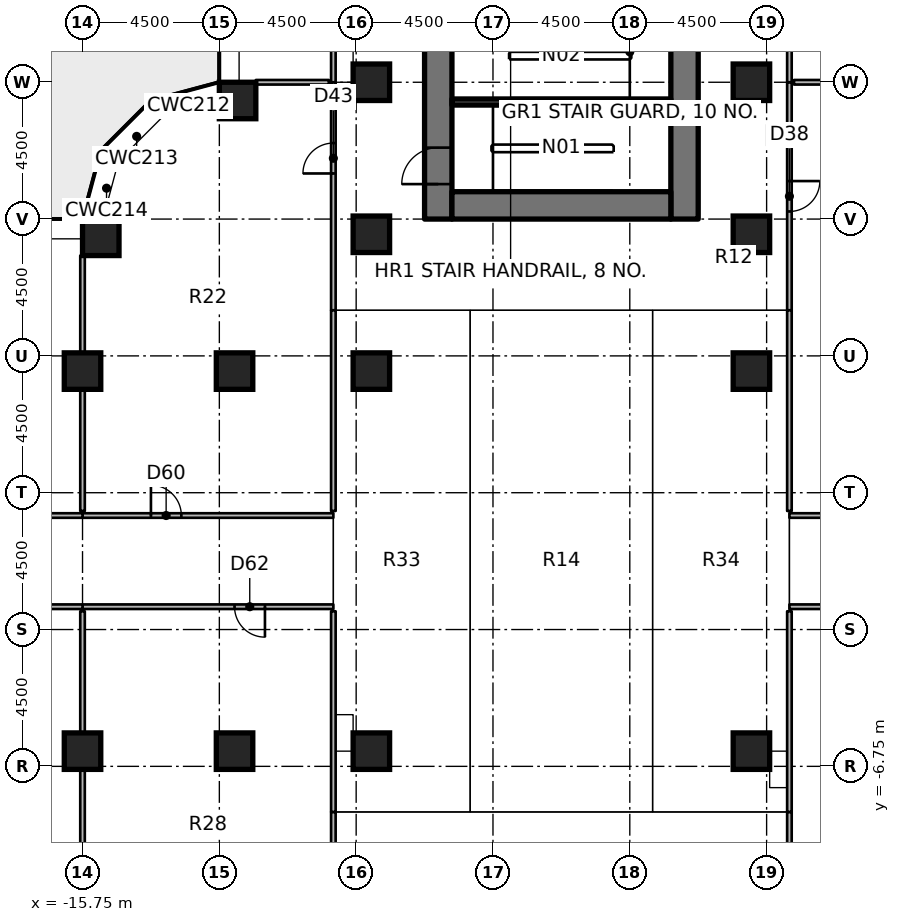
"""IFC4 building model, lengths in metres.
Left out: names, types, materials, properties, quantities, classifications, styles, units other than length and angle.
Written with IfcOpenShell. Run it as: python <this file> out.ifc"""

import sys

from ifc_helpers import new_model, si_unit, direction, frame, frame_2d, origin, origin_2d, place, context, subcontext, project, spatial, rectangle, extrude, element, fill, save


model = new_model("IFC4")
c1 = context("Model", 3, precision=1e-05, world=origin(), true_north=direction((0.0, 1.0)))
c2 = subcontext(c1, "Body", "Model", "MODEL_VIEW")
j1 = project(units=[si_unit("LENGTHUNIT", "METRE"), si_unit("PLANEANGLEUNIT", "RADIAN")], contexts=[c1])
p1 = place(None, origin())
s1 = spatial("IfcSite", under=j1, at=p1, CompositionType="ELEMENT")
p2 = place(p1, origin())
s2 = spatial("IfcBuilding", under=s1, at=p2, CompositionType="ELEMENT")
p3 = place(p2, frame((0.0, 0.0, 22.0)))
s3 = spatial("IfcBuildingStorey", under=s2, at=p3, CompositionType="ELEMENT", Elevation=22.0)
for number, where, z_axis, x_axis in (
    (1, (-15.75, -6.25, 0.0), (0.0, 0.0, 1.0), (1.0, 0.0, 0.0)),
    (2, (-15.75, 6.25, 0.0), (0.0, 0.0, 1.0), (1.0, 0.0, 0.0)),
):
    element("IfcColumn", number, at=place(p3, frame(where, z_axis=z_axis, x_axis=x_axis)), inside=s3, PredefinedType="COLUMN", context=c2, shape_type="SweptSolid", body=[
        extrude(rectangle(XDim=1.2, YDim=1.2, at=origin_2d()), origin(), (0.0, 0.0, 1.0), 4.85),
    ])
p4 = place(p3, frame((-15.15, 10.65, 0.0), z_axis=(0.0, 0.0, 1.0), x_axis=(1.0, 0.0, 0.0)))
e3 = element("IfcColumn", 3, at=p4, inside=s3, PredefinedType="COLUMN", context=c2, shape_type="SweptSolid", body=[
    extrude(rectangle(XDim=1.2, YDim=1.2, at=origin_2d()), origin(), (0.0, 0.0, 1.0), 4.55),
])
for number, where, z_axis, x_axis in (
    (4, (-10.75, -6.25, 0.0), (0.0, 0.0, 1.0), (1.0, 0.0, 0.0)),
    (5, (-10.75, 6.25, 0.0), (0.0, 0.0, 1.0), (1.0, 0.0, 0.0)),
):
    element("IfcColumn", number, at=place(p3, frame(where, z_axis=z_axis, x_axis=x_axis)), inside=s3, PredefinedType="COLUMN", context=c2, shape_type="SweptSolid", body=[
        extrude(rectangle(XDim=1.2, YDim=1.2, at=origin_2d()), origin(), (0.0, 0.0, 1.0), 4.85),
    ])
p5 = place(p3, frame((-10.65, 15.15, 0.0), z_axis=(0.0, 0.0, 1.0), x_axis=(1.0, 0.0, 0.0)))
e6 = element("IfcColumn", 6, at=p5, inside=s3, PredefinedType="COLUMN", context=c2, shape_type="SweptSolid", body=[
    extrude(rectangle(XDim=1.2, YDim=1.2, at=origin_2d()), origin(), (0.0, 0.0, 1.0), 4.55),
])
for number, where, z_axis, x_axis in (
    (7, (-6.25, -6.25, 0.0), (0.0, 0.0, 1.0), (1.0, 0.0, 0.0)),
    (8, (-6.25, 6.25, 0.0), (0.0, 0.0, 1.0), (1.0, 0.0, 0.0)),
    (9, (-6.25, 10.75, 0.0), (0.0, 0.0, 1.0), (1.0, 0.0, 0.0)),
    (10, (-6.25, 15.75, 0.0), (0.0, 0.0, 1.0), (1.0, 0.0, 0.0)),
    (11, (6.25, -6.25, 0.0), (0.0, 0.0, 1.0), (1.0, 0.0, 0.0)),
    (12, (6.25, 6.25, 0.0), (0.0, 0.0, 1.0), (1.0, 0.0, 0.0)),
    (13, (6.25, 10.75, 0.0), (0.0, 0.0, 1.0), (1.0, 0.0, 0.0)),
    (14, (6.25, 15.75, 0.0), (0.0, 0.0, 1.0), (1.0, 0.0, 0.0)),
):
    element("IfcColumn", number, at=place(p3, frame(where, z_axis=z_axis, x_axis=x_axis)), inside=s3, PredefinedType="COLUMN", context=c2, shape_type="SweptSolid", body=[
        extrude(rectangle(XDim=1.2, YDim=1.2, at=origin_2d()), origin(), (0.0, 0.0, 1.0), 4.85),
    ])
p6 = place(p3, frame((-4.05, 11.25, 0.0), z_axis=(0.0, 0.0, 1.0), x_axis=(0.0, 1.0, 0.0)))
e15 = element("IfcWall", 15, at=p6, inside=s3, PredefinedType="SHEAR", context=c2, shape_type="SweptSolid", body=[
    extrude(rectangle(XDim=15.0, YDim=0.9, at=frame_2d((7.5, 0.0))), origin(), (0.0, 0.0, 1.0), 5.0),
])
p7 = place(p6, frame((7.15, 0.0, 0.0)))
e16 = element("IfcOpeningElement", 16, at=p7, cuts=e15, PredefinedType="OPENING", context=c2, shape_type="SweptSolid", body=[
    extrude(rectangle(XDim=1.5, YDim=2.3, at=frame_2d((0.75, 1.15))), frame((0.0, 0.46, 0.0), z_axis=(0.0, -1.0, 0.0), x_axis=(1.0, 0.0, 0.0)), (0.0, 0.0, 1.0), 0.92),
])
p8 = place(p6, frame((13.9, 0.0, 0.0)))
e17 = element("IfcOpeningElement", 17, at=p8, cuts=e15, PredefinedType="OPENING", context=c2, shape_type="SweptSolid", body=[
    extrude(rectangle(XDim=0.9, YDim=2.1, at=frame_2d((0.45, 1.05))), frame((0.0, 0.46, 0.0), z_axis=(0.0, -1.0, 0.0), x_axis=(1.0, 0.0, 0.0)), (0.0, 0.0, 1.0), 0.92),
])
p9 = place(p6, frame((1.15, 0.0, 0.0)))
e18 = element("IfcOpeningElement", 18, at=p9, cuts=e15, PredefinedType="OPENING", context=c2, shape_type="SweptSolid", body=[
    extrude(rectangle(XDim=1.2, YDim=2.1, at=frame_2d((0.6, 1.05))), frame((0.0, 0.46, 0.0), z_axis=(0.0, -1.0, 0.0), x_axis=(1.0, 0.0, 0.0)), (0.0, 0.0, 1.0), 0.92),
])
p10 = place(p3, frame((4.05, 11.25, 0.0), z_axis=(0.0, 0.0, 1.0), x_axis=(0.0, 1.0, 0.0)))
e19 = element("IfcWall", 19, at=p10, inside=s3, PredefinedType="SHEAR", context=c2, shape_type="SweptSolid", body=[
    extrude(rectangle(XDim=15.0, YDim=0.9, at=frame_2d((7.5, 0.0))), origin(), (0.0, 0.0, 1.0), 5.0),
])
p11 = place(p10, frame((7.15, 0.0, 0.0)))
e20 = element("IfcOpeningElement", 20, at=p11, cuts=e19, PredefinedType="OPENING", context=c2, shape_type="SweptSolid", body=[
    extrude(rectangle(XDim=1.5, YDim=2.3, at=frame_2d((0.75, 1.15))), frame((0.0, 0.46, 0.0), z_axis=(0.0, -1.0, 0.0), x_axis=(1.0, 0.0, 0.0)), (0.0, 0.0, 1.0), 0.92),
])
p12 = place(p10, frame((5.55, 0.0, 0.0)))
e21 = element("IfcOpeningElement", 21, at=p12, cuts=e19, PredefinedType="OPENING", context=c2, shape_type="SweptSolid", body=[
    extrude(rectangle(XDim=1.2, YDim=2.1, at=frame_2d((0.6, 1.05))), frame((0.0, 0.46, 0.0), z_axis=(0.0, -1.0, 0.0), x_axis=(1.0, 0.0, 0.0)), (0.0, 0.0, 1.0), 0.92),
])
p13 = place(p3, frame((-3.6, 11.7, 0.0), z_axis=(0.0, 0.0, 1.0), x_axis=(1.0, 0.0, 0.0)))
e22 = element("IfcWall", 22, at=p13, inside=s3, PredefinedType="SHEAR", context=c2, shape_type="SweptSolid", body=[
    extrude(rectangle(XDim=7.2, YDim=0.9, at=frame_2d((3.6, 0.0))), origin(), (0.0, 0.0, 1.0), 5.0),
])
p14 = place(p3, frame((-3.6, 15.1, 0.0), z_axis=(0.0, 0.0, 1.0), x_axis=(1.0, 0.0, 0.0)))
e23 = element("IfcWall", 23, at=p14, inside=s3, PredefinedType="SHEAR", context=c2, shape_type="SweptSolid", body=[
    extrude(rectangle(XDim=7.2, YDim=0.2, at=frame_2d((3.6, 0.0))), origin(), (0.0, 0.0, 1.0), 4.85),
])
p15 = place(p3, frame((7.5, 15.75, 0.0), z_axis=(0.0, 0.0, 1.0), x_axis=(0.0, -1.0, 0.0)))
e24 = element("IfcWall", 24, at=p15, inside=s3, PredefinedType="PARTITIONING", context=c2, shape_type="SweptSolid", body=[
    extrude(rectangle(XDim=7.5, YDim=0.15, at=frame_2d((3.75, 0.0))), origin(), (0.0, 0.0, 1.0), 3.93),
])
p16 = place(p15, frame((3.25, 0.0, 0.0)))
e25 = element("IfcOpeningElement", 25, at=p16, cuts=e24, PredefinedType="OPENING", context=c2, shape_type="SweptSolid", body=[
    extrude(rectangle(XDim=1.0, YDim=2.1, at=frame_2d((0.5, 1.05))), frame((0.0, 0.085, 0.0), z_axis=(0.0, -1.0, 0.0), x_axis=(1.0, 0.0, 0.0)), (0.0, 0.0, 1.0), 0.17),
])
p17 = place(p3, frame((7.5, 30.0, 0.0), z_axis=(0.0, 0.0, 1.0), x_axis=(0.0, -1.0, 0.0)))
e26 = element("IfcWall", 26, at=p17, inside=s3, PredefinedType="PARTITIONING", context=c2, shape_type="SweptSolid", body=[
    extrude(rectangle(XDim=14.25, YDim=0.15, at=frame_2d((7.125, 0.0))), origin(), (0.0, 0.0, 1.0), 4.55),
])
p18 = place(p17, frame((6.675, 0.0, 0.0)))
e27 = element("IfcOpeningElement", 27, at=p18, cuts=e26, PredefinedType="OPENING", context=c2, shape_type="SweptSolid", body=[
    extrude(rectangle(XDim=0.9, YDim=2.1, at=frame_2d((0.45, 1.05))), frame((0.0, 0.085, 0.0), z_axis=(0.0, -1.0, 0.0), x_axis=(1.0, 0.0, 0.0)), (0.0, 0.0, 1.0), 0.17),
])
p19 = place(p3, frame((-7.5, 8.25, 0.0), z_axis=(0.0, 0.0, 1.0), x_axis=(0.0, 1.0, 0.0)))
e28 = element("IfcWall", 28, at=p19, inside=s3, PredefinedType="PARTITIONING", context=c2, shape_type="SweptSolid", body=[
    extrude(rectangle(XDim=7.5, YDim=0.15, at=frame_2d((3.75, 0.0))), origin(), (0.0, 0.0, 1.0), 3.93),
])
p20 = place(p19, frame((4.5, 0.0, 0.0)))
e29 = element("IfcOpeningElement", 29, at=p20, cuts=e28, PredefinedType="OPENING", context=c2, shape_type="SweptSolid", body=[
    extrude(rectangle(XDim=1.0, YDim=2.1, at=frame_2d((0.5, 1.05))), frame((0.0, 0.085, 0.0), z_axis=(0.0, -1.0, 0.0), x_axis=(1.0, 0.0, 0.0)), (0.0, 0.0, 1.0), 0.17),
])
p21 = place(p3, frame((-7.5, 15.75, 0.0), z_axis=(0.0, 0.0, 1.0), x_axis=(0.0, 1.0, 0.0)))
e30 = element("IfcWall", 30, at=p21, inside=s3, PredefinedType="PARTITIONING", context=c2, shape_type="SweptSolid", body=[
    extrude(rectangle(XDim=14.25, YDim=0.15, at=frame_2d((7.125, 0.0))), origin(), (0.0, 0.0, 1.0), 4.55),
])
p22 = place(p21, frame((6.675, 0.0, 0.0)))
e31 = element("IfcOpeningElement", 31, at=p22, cuts=e30, PredefinedType="OPENING", context=c2, shape_type="SweptSolid", body=[
    extrude(rectangle(XDim=0.9, YDim=2.1, at=frame_2d((0.45, 1.05))), frame((0.0, 0.085, 0.0), z_axis=(0.0, -1.0, 0.0), x_axis=(1.0, 0.0, 0.0)), (0.0, 0.0, 1.0), 0.17),
])
p23 = place(p3, frame((7.5, -8.25, 0.0), z_axis=(0.0, 0.0, 1.0), x_axis=(0.0, -1.0, 0.0)))
e32 = element("IfcWall", 32, at=p23, inside=s3, PredefinedType="PARTITIONING", context=c2, shape_type="SweptSolid", body=[
    extrude(rectangle(XDim=7.5, YDim=0.15, at=frame_2d((3.75, 0.0))), origin(), (0.0, 0.0, 1.0), 3.93),
])
p24 = place(p3, frame((-7.5, -15.75, 0.0), z_axis=(0.0, 0.0, 1.0), x_axis=(0.0, 1.0, 0.0)))
e33 = element("IfcWall", 33, at=p24, inside=s3, PredefinedType="PARTITIONING", context=c2, shape_type="SweptSolid", body=[
    extrude(rectangle(XDim=7.5, YDim=0.15, at=frame_2d((3.75, 0.0))), origin(), (0.0, 0.0, 1.0), 3.93),
])
p25 = place(p24, frame((3.25, 0.0, 0.0)))
e34 = element("IfcOpeningElement", 34, at=p25, cuts=e33, PredefinedType="OPENING", context=c2, shape_type="SweptSolid", body=[
    extrude(rectangle(XDim=1.0, YDim=2.1, at=frame_2d((0.5, 1.05))), frame((0.0, 0.085, 0.0), z_axis=(0.0, -1.0, 0.0), x_axis=(1.0, 0.0, 0.0)), (0.0, 0.0, 1.0), 0.17),
])
p26 = place(p3, frame((7.5, 1.5, 0.0), z_axis=(0.0, 0.0, 1.0), x_axis=(1.0, 0.0, 0.0)))
e35 = element("IfcWall", 35, at=p26, inside=s3, PredefinedType="PARTITIONING", context=c2, shape_type="SweptSolid", body=[
    extrude(rectangle(XDim=8.25, YDim=0.15, at=frame_2d((4.125, 0.0))), origin(), (0.0, 0.0, 1.0), 4.063),
])
p27 = place(p26, frame((2.25, 0.0, 0.0)))
e36 = element("IfcOpeningElement", 36, at=p27, cuts=e35, PredefinedType="OPENING", context=c2, shape_type="SweptSolid", body=[
    extrude(rectangle(XDim=1.0, YDim=2.1, at=frame_2d((0.5, 1.05))), frame((0.0, 0.085, 0.0), z_axis=(0.0, -1.0, 0.0), x_axis=(1.0, 0.0, 0.0)), (0.0, 0.0, 1.0), 0.17),
])
p28 = place(p3, frame((15.75, -1.5, 0.0), z_axis=(0.0, 0.0, 1.0), x_axis=(-1.0, 0.0, 0.0)))
e37 = element("IfcWall", 37, at=p28, inside=s3, PredefinedType="PARTITIONING", context=c2, shape_type="SweptSolid", body=[
    extrude(rectangle(XDim=8.25, YDim=0.15, at=frame_2d((4.125, 0.0))), origin(), (0.0, 0.0, 1.0), 4.063),
])
p29 = place(p28, frame((3.675, 0.0, 0.0)))
e38 = element("IfcOpeningElement", 38, at=p29, cuts=e37, PredefinedType="OPENING", context=c2, shape_type="SweptSolid", body=[
    extrude(rectangle(XDim=0.9, YDim=2.1, at=frame_2d((0.45, 1.05))), frame((0.0, 0.085, 0.0), z_axis=(0.0, -1.0, 0.0), x_axis=(1.0, 0.0, 0.0)), (0.0, 0.0, 1.0), 0.17),
])
p30 = place(p3, frame((-15.75, 1.5, 0.0), z_axis=(0.0, 0.0, 1.0), x_axis=(1.0, 0.0, 0.0)))
e39 = element("IfcWall", 39, at=p30, inside=s3, PredefinedType="PARTITIONING", context=c2, shape_type="SweptSolid", body=[
    extrude(rectangle(XDim=8.25, YDim=0.15, at=frame_2d((4.125, 0.0))), origin(), (0.0, 0.0, 1.0), 4.063),
])
p31 = place(p30, frame((2.25, 0.0, 0.0)))
e40 = element("IfcOpeningElement", 40, at=p31, cuts=e39, PredefinedType="OPENING", context=c2, shape_type="SweptSolid", body=[
    extrude(rectangle(XDim=1.0, YDim=2.1, at=frame_2d((0.5, 1.05))), frame((0.0, 0.085, 0.0), z_axis=(0.0, -1.0, 0.0), x_axis=(1.0, 0.0, 0.0)), (0.0, 0.0, 1.0), 0.17),
])
p32 = place(p3, frame((-37.65, 1.5, 0.0), z_axis=(0.0, 0.0, 1.0), x_axis=(1.0, 0.0, 0.0)))
e41 = element("IfcWall", 41, at=p32, inside=s3, PredefinedType="PARTITIONING", context=c2, shape_type="SweptSolid", body=[
    extrude(rectangle(XDim=21.9, YDim=0.15, at=frame_2d((10.95, 0.0))), origin(), (0.0, 0.0, 1.0), 3.93),
])
p33 = place(p32, frame((10.2, 0.0, 0.0)))
e42 = element("IfcOpeningElement", 42, at=p33, cuts=e41, PredefinedType="OPENING", context=c2, shape_type="SweptSolid", body=[
    extrude(rectangle(XDim=0.9, YDim=2.1, at=frame_2d((0.45, 1.05))), frame((0.0, 0.085, 0.0), z_axis=(0.0, -1.0, 0.0), x_axis=(1.0, 0.0, 0.0)), (0.0, 0.0, 1.0), 0.17),
])
p34 = place(p3, frame((-7.5, -1.5, 0.0), z_axis=(0.0, 0.0, 1.0), x_axis=(-1.0, 0.0, 0.0)))
e43 = element("IfcWall", 43, at=p34, inside=s3, PredefinedType="PARTITIONING", context=c2, shape_type="SweptSolid", body=[
    extrude(rectangle(XDim=8.25, YDim=0.15, at=frame_2d((4.125, 0.0))), origin(), (0.0, 0.0, 1.0), 4.063),
])
p35 = place(p34, frame((2.25, 0.0, 0.0)))
e44 = element("IfcOpeningElement", 44, at=p35, cuts=e43, PredefinedType="OPENING", context=c2, shape_type="SweptSolid", body=[
    extrude(rectangle(XDim=1.0, YDim=2.1, at=frame_2d((0.5, 1.05))), frame((0.0, 0.085, 0.0), z_axis=(0.0, -1.0, 0.0), x_axis=(1.0, 0.0, 0.0)), (0.0, 0.0, 1.0), 0.17),
])
p36 = place(p3, frame((-15.75, -1.5, 0.0), z_axis=(0.0, 0.0, 1.0), x_axis=(-1.0, 0.0, 0.0)))
e45 = element("IfcWall", 45, at=p36, inside=s3, PredefinedType="PARTITIONING", context=c2, shape_type="SweptSolid", body=[
    extrude(rectangle(XDim=2.25, YDim=0.15, at=frame_2d((1.125, 0.0))), origin(), (0.0, 0.0, 1.0), 4.063),
])
p37 = place(p3, frame((7.65, 15.75, 0.0), z_axis=(0.0, 0.0, 1.0), x_axis=(1.0, 0.0, 0.0)))
e46 = element("IfcWall", 46, at=p37, inside=s3, PredefinedType="PARTITIONING", context=c2, shape_type="SweptSolid", body=[
    extrude(rectangle(XDim=2.4, YDim=0.15, at=frame_2d((1.2, 0.0))), origin(), (0.0, 0.0, 1.0), 4.55),
])
p38 = place(p3, frame((7.5, 1.65, 0.0), z_axis=(0.0, 0.0, 1.0), x_axis=(0.0, 1.0, 0.0)))
e47 = element("IfcWall", 47, at=p38, inside=s3, PredefinedType="PARTITIONING", context=c2, shape_type="SweptSolid", body=[
    extrude(rectangle(XDim=6.6, YDim=0.15, at=frame_2d((3.3, 0.0))), origin(), (0.0, 0.0, 1.0), 3.911),
])
p39 = place(p3, frame((-15.75, 1.65, 0.0), z_axis=(0.0, 0.0, 1.0), x_axis=(0.0, 1.0, 0.0)))
e48 = element("IfcWall", 48, at=p39, inside=s3, PredefinedType="PARTITIONING", context=c2, shape_type="SweptSolid", body=[
    extrude(rectangle(XDim=4.0, YDim=0.15, at=frame_2d((2.0, 0.0))), origin(), (0.0, 0.0, 1.0), 4.063),
])
p40 = place(p3, frame((-15.75, 6.85, 0.0), z_axis=(0.0, 0.0, 1.0), x_axis=(0.0, 1.0, 0.0)))
e49 = element("IfcWall", 49, at=p40, inside=s3, PredefinedType="PARTITIONING", context=c2, shape_type="SweptSolid", body=[
    extrude(rectangle(XDim=3.2, YDim=0.15, at=frame_2d((1.6, 0.0))), origin(), (0.0, 0.0, 1.0), 4.55),
])
p41 = place(p3, frame((-10.05, 15.75, 0.0), z_axis=(0.0, 0.0, 1.0), x_axis=(1.0, 0.0, 0.0)))
e50 = element("IfcWall", 50, at=p41, inside=s3, PredefinedType="PARTITIONING", context=c2, shape_type="SweptSolid", body=[
    extrude(rectangle(XDim=2.4, YDim=0.15, at=frame_2d((1.2, 0.0))), origin(), (0.0, 0.0, 1.0), 4.55),
])
for number, where, z_axis, x_axis in (
    (51, (-7.5, 8.25, 0.0), (0.0, 0.0, 1.0), (0.0, -1.0, 0.0)),
    (52, (7.5, -8.25, 0.0), (0.0, 0.0, 1.0), (0.0, 1.0, 0.0)),
):
    element("IfcWall", number, at=place(p3, frame(where, z_axis=z_axis, x_axis=x_axis)), inside=s3, PredefinedType="PARTITIONING", context=c2, shape_type="SweptSolid", body=[
        extrude(rectangle(XDim=6.6, YDim=0.15, at=frame_2d((3.3, 0.0))), origin(), (0.0, 0.0, 1.0), 3.911),
    ])
p42 = place(p3, frame((-15.75, -10.05, 0.0), z_axis=(0.0, 0.0, 1.0), x_axis=(0.0, 1.0, 0.0)))
e53 = element("IfcWall", 53, at=p42, inside=s3, PredefinedType="PARTITIONING", context=c2, shape_type="SweptSolid", body=[
    extrude(rectangle(XDim=3.2, YDim=0.15, at=frame_2d((1.6, 0.0))), origin(), (0.0, 0.0, 1.0), 4.55),
])
p43 = place(p3, frame((-15.75, -5.65, 0.0), z_axis=(0.0, 0.0, 1.0), x_axis=(0.0, 1.0, 0.0)))
e54 = element("IfcWall", 54, at=p43, inside=s3, PredefinedType="PARTITIONING", context=c2, shape_type="SweptSolid", body=[
    extrude(rectangle(XDim=4.0, YDim=0.15, at=frame_2d((2.0, 0.0))), origin(), (0.0, 0.0, 1.0), 4.063),
])
p44 = place(p3, frame((-7.5, -1.65, 0.0), z_axis=(0.0, 0.0, 1.0), x_axis=(0.0, -1.0, 0.0)))
e55 = element("IfcWall", 55, at=p44, inside=s3, PredefinedType="PARTITIONING", context=c2, shape_type="SweptSolid", body=[
    extrude(rectangle(XDim=6.6, YDim=0.15, at=frame_2d((3.3, 0.0))), origin(), (0.0, 0.0, 1.0), 3.911),
])
p45 = place(p9, origin())
e56 = element("IfcDoor", 56, at=p45, inside=s3, OperationType="SINGLE_SWING_RIGHT", PredefinedType="DOOR", context=c2, shape_type="SweptSolid", body=[
    extrude(rectangle(XDim=1.2, YDim=2.1, at=frame_2d((0.6, 1.05))), frame((0.0, 0.025, 0.0), z_axis=(0.0, -1.0, 0.0), x_axis=(1.0, 0.0, 0.0)), (0.0, 0.0, 1.0), 0.05),
])
fill(e18, e56)
p46 = place(p16, origin())
e57 = element("IfcDoor", 57, at=p46, inside=s3, OperationType="SINGLE_SWING_LEFT", PredefinedType="DOOR", context=c2, shape_type="SweptSolid", body=[
    extrude(rectangle(XDim=1.0, YDim=2.1, at=frame_2d((0.5, 1.05))), frame((0.0, 0.025, 0.0), z_axis=(0.0, -1.0, 0.0), x_axis=(1.0, 0.0, 0.0)), (0.0, 0.0, 1.0), 0.05),
])
fill(e25, e57)
p47 = place(p20, origin())
e58 = element("IfcDoor", 58, at=p47, inside=s3, OperationType="SINGLE_SWING_LEFT", PredefinedType="DOOR", context=c2, shape_type="SweptSolid", body=[
    extrude(rectangle(XDim=1.0, YDim=2.1, at=frame_2d((0.5, 1.05))), frame((0.0, 0.025, 0.0), z_axis=(0.0, -1.0, 0.0), x_axis=(1.0, 0.0, 0.0)), (0.0, 0.0, 1.0), 0.05),
])
fill(e29, e58)
p48 = place(p31, origin())
e59 = element("IfcDoor", 59, at=p48, inside=s3, OperationType="SINGLE_SWING_LEFT", PredefinedType="DOOR", context=c2, shape_type="SweptSolid", body=[
    extrude(rectangle(XDim=1.0, YDim=2.1, at=frame_2d((0.5, 1.05))), frame((0.0, 0.025, 0.0), z_axis=(0.0, -1.0, 0.0), x_axis=(1.0, 0.0, 0.0)), (0.0, 0.0, 1.0), 0.05),
])
fill(e40, e59)
p49 = place(p35, origin())
e60 = element("IfcDoor", 60, at=p49, inside=s3, OperationType="SINGLE_SWING_LEFT", PredefinedType="DOOR", context=c2, shape_type="SweptSolid", body=[
    extrude(rectangle(XDim=1.0, YDim=2.1, at=frame_2d((0.5, 1.05))), frame((0.0, 0.025, 0.0), z_axis=(0.0, -1.0, 0.0), x_axis=(1.0, 0.0, 0.0)), (0.0, 0.0, 1.0), 0.05),
])
fill(e44, e60)
save(model, sys.argv[1])
